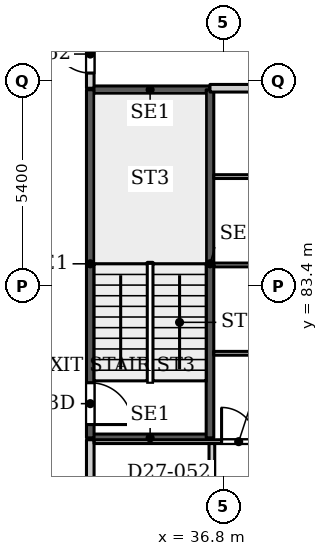
"""IFC4 building model, lengths in metres.
Left out: names, types, materials, properties, quantities, classifications, styles, units other than length and angle.
Written with IfcOpenShell. Run it as: python <this file> out.ifc"""

import sys

from ifc_helpers import new_model, si_unit, direction, frame, frame_2d, origin, place, context, subcontext, project, spatial, rectangle, extrude, source, transform, mapped, element, fill, save


model = new_model("IFC4")
c1 = context("Model", 3, precision=1e-05, world=origin(), true_north=direction((0.0, 1.0)))
c2 = subcontext(c1, "Body", "Model", "MODEL_VIEW")
j1 = project(units=[si_unit("LENGTHUNIT", "METRE"), si_unit("PLANEANGLEUNIT", "RADIAN")], contexts=[c1])
p1 = place(None, origin())
s1 = spatial("IfcSite", under=j1, at=p1, CompositionType="ELEMENT")
p2 = place(p1, origin())
s2 = spatial("IfcBuilding", under=s1, at=p2, CompositionType="ELEMENT")
p3 = place(p2, frame((0.0, 0.0, 121.4)))
s3 = spatial("IfcBuildingStorey", under=s2, at=p3, CompositionType="ELEMENT", Elevation=121.4)
for number, where, z_axis, x_axis in (
    (1, (33.3, 79.4, 0.0), (0.0, 0.0, 1.0), (1.0, 0.0, 0.0)),
    (2, (33.3, 88.56, 0.0), (0.0, 0.0, 1.0), (1.0, 0.0, 0.0)),
):
    element("IfcWall", number, at=place(p3, frame(where, z_axis=z_axis, x_axis=x_axis)), inside=s3, PredefinedType="SHEAR", context=c2, shape_type="SweptSolid", body=[
        extrude(rectangle(XDim=3.15, YDim=0.2, at=frame_2d((1.575, 0.0))), origin(), (0.0, 0.0, 1.0), 3.9),
    ])
p4 = place(p3, frame((33.3, 79.4, 0.0), z_axis=(0.0, 0.0, 1.0), x_axis=(0.0, 1.0, 0.0)))
e3 = element("IfcWall", 3, at=p4, inside=s3, PredefinedType="SHEAR", context=c2, shape_type="SweptSolid", body=[
    extrude(rectangle(XDim=9.16, YDim=0.2, at=frame_2d((4.58, 0.0))), origin(), (0.0, 0.0, 1.0), 3.9),
])
p5 = place(p4, frame((0.35, 0.0, 0.0)))
e4 = element("IfcOpeningElement", 4, at=p5, cuts=e3, PredefinedType="OPENING", context=c2, shape_type="SweptSolid", body=[
    extrude(rectangle(XDim=1.1, YDim=2.2, at=frame_2d((0.55, 1.1))), frame((0.0, 0.11, 0.0), z_axis=(0.0, -1.0, 0.0), x_axis=(1.0, 0.0, 0.0)), (0.0, 0.0, 1.0), 0.22),
])
p6 = place(p3, frame((36.45, 79.4, 0.0), z_axis=(0.0, 0.0, 1.0), x_axis=(0.0, 1.0, 0.0)))
e5 = element("IfcWall", 5, at=p6, inside=s3, PredefinedType="SHEAR", context=c2, shape_type="SweptSolid", body=[
    extrude(rectangle(XDim=9.16, YDim=0.2, at=frame_2d((4.58, 0.0))), origin(), (0.0, 0.0, 1.0), 3.9),
])
p7 = place(p3, frame((33.3, 54.4, 0.0), z_axis=(0.0, 0.0, 1.0), x_axis=(0.0, 1.0, 0.0)))
e6 = element("IfcWall", 6, at=p7, inside=s3, PredefinedType="PARTITIONING", context=c2, shape_type="SweptSolid", body=[
    extrude(rectangle(XDim=24.95, YDim=0.2, at=frame_2d((12.475, 0.0))), origin(), (0.0, 0.0, 1.0), 3.6),
])
p8 = place(p7, frame((3.1, 0.0, 0.0)))
e7 = element("IfcOpeningElement", 7, at=p8, cuts=e6, PredefinedType="OPENING", context=c2, shape_type="SweptSolid", body=[
    extrude(rectangle(XDim=1.0, YDim=2.1, at=frame_2d((0.5, 1.05))), frame((0.0, 0.11, 0.0), z_axis=(0.0, -1.0, 0.0), x_axis=(1.0, 0.0, 0.0)), (0.0, 0.0, 1.0), 0.22),
])
p9 = place(p7, frame((14.8, 0.0, 0.0)))
e8 = element("IfcOpeningElement", 8, at=p9, cuts=e6, PredefinedType="OPENING", context=c2, shape_type="SweptSolid", body=[
    extrude(rectangle(XDim=1.0, YDim=2.1, at=frame_2d((0.5, 1.05))), frame((0.0, 0.11, 0.0), z_axis=(0.0, -1.0, 0.0), x_axis=(1.0, 0.0, 0.0)), (0.0, 0.0, 1.0), 0.22),
])
p10 = place(p3, frame((33.3, 88.6, 0.0), z_axis=(0.0, 0.0, 1.0), x_axis=(0.0, 1.0, 0.0)))
e9 = element("IfcWall", 9, at=p10, inside=s3, PredefinedType="PARTITIONING", context=c2, shape_type="SweptSolid", body=[
    extrude(rectangle(XDim=5.175, YDim=0.2, at=frame_2d((2.587, 0.0))), origin(), (0.0, 0.0, 1.0), 3.6),
])
p11 = place(p10, frame((0.4, 0.0, 0.0)))
e10 = element("IfcOpeningElement", 10, at=p11, cuts=e9, PredefinedType="OPENING", context=c2, shape_type="SweptSolid", body=[
    extrude(rectangle(XDim=1.0, YDim=2.1, at=frame_2d((0.5, 1.05))), frame((0.0, 0.11, 0.0), z_axis=(0.0, -1.0, 0.0), x_axis=(1.0, 0.0, 0.0)), (0.0, 0.0, 1.0), 0.22),
])
p12 = place(p3, frame((33.4, 79.3, 0.0), z_axis=(0.0, 0.0, 1.0), x_axis=(1.0, 0.0, 0.0)))
e11 = element("IfcWall", 11, at=p12, inside=s3, PredefinedType="PARTITIONING", context=c2, shape_type="SweptSolid", body=[
    extrude(rectangle(XDim=12.5, YDim=0.1, at=frame_2d((6.25, 0.0))), origin(), (0.0, 0.0, 1.0), 3.6),
])
p13 = place(p12, frame((3.355, 0.0, 0.0)))
e12 = element("IfcOpeningElement", 12, at=p13, cuts=e11, PredefinedType="OPENING", context=c2, shape_type="SweptSolid", body=[
    extrude(rectangle(XDim=0.9, YDim=2.1, at=frame_2d((0.45, 1.05))), frame((0.0, 0.06, 0.0), z_axis=(0.0, -1.0, 0.0), x_axis=(1.0, 0.0, 0.0)), (0.0, 0.0, 1.0), 0.12),
])
p14 = place(p3, frame((36.5, 71.125, 0.0), z_axis=(0.0, 0.0, 1.0), x_axis=(0.0, 1.0, 0.0)))
e13 = element("IfcWall", 13, at=p14, inside=s3, PredefinedType="PARTITIONING", context=c2, shape_type="SweptSolid", body=[
    extrude(rectangle(XDim=8.125, YDim=0.15, at=frame_2d((4.062, 0.0))), origin(), (0.0, 0.0, 1.0), 3.6),
])
p15 = place(p14, frame((0.875, 0.0, 0.0)))
e14 = element("IfcOpeningElement", 14, at=p15, cuts=e13, PredefinedType="OPENING", context=c2, shape_type="SweptSolid", body=[
    extrude(rectangle(XDim=0.8, YDim=2.1, at=frame_2d((0.4, 1.05))), frame((0.0, 0.085, 0.0), z_axis=(0.0, -1.0, 0.0), x_axis=(1.0, 0.0, 0.0)), (0.0, 0.0, 1.0), 0.17),
])
p16 = place(p14, frame((5.775, 0.0, 0.0)))
e15 = element("IfcOpeningElement", 15, at=p16, cuts=e13, PredefinedType="OPENING", context=c2, shape_type="SweptSolid", body=[
    extrude(rectangle(XDim=0.9, YDim=2.1, at=frame_2d((0.45, 1.05))), frame((0.0, 0.085, 0.0), z_axis=(0.0, -1.0, 0.0), x_axis=(1.0, 0.0, 0.0)), (0.0, 0.0, 1.0), 0.17),
])
p17 = place(p14, frame((2.975, 0.0, 0.0)))
e16 = element("IfcOpeningElement", 16, at=p17, cuts=e13, PredefinedType="OPENING", context=c2, shape_type="SweptSolid", body=[
    extrude(rectangle(XDim=0.8, YDim=2.1, at=frame_2d((0.4, 1.05))), frame((0.0, 0.085, 0.0), z_axis=(0.0, -1.0, 0.0), x_axis=(1.0, 0.0, 0.0)), (0.0, 0.0, 1.0), 0.17),
])
p18 = place(p3, frame((36.45, 88.6, 0.0), z_axis=(0.0, 0.0, 1.0), x_axis=(1.0, 0.0, 0.0)))
e17 = element("IfcWall", 17, at=p18, inside=s3, PredefinedType="PARTITIONING", context=c2, shape_type="SweptSolid", body=[
    extrude(rectangle(XDim=9.45, YDim=0.2, at=frame_2d((4.725, 0.0))), origin(), (0.0, 0.0, 1.0), 2.5),
])
p19 = place(p3, frame((36.549, 81.625, 0.0), z_axis=(0.0, 0.0, 1.0), x_axis=(1.0, 0.0, 0.0)))
e18 = element("IfcWall", 18, at=p19, inside=s3, PredefinedType="PARTITIONING", context=c2, shape_type="SweptSolid", body=[
    extrude(rectangle(XDim=9.351, YDim=0.1, at=frame_2d((4.675, 0.0))), origin(), (0.0, 0.0, 1.0), 3.6),
])
p20 = place(p19, frame((4.176, 0.0, 0.0)))
e19 = element("IfcOpeningElement", 19, at=p20, cuts=e18, PredefinedType="OPENING", context=c2, shape_type="SweptSolid", body=[
    extrude(rectangle(XDim=0.9, YDim=2.1, at=frame_2d((0.45, 1.05))), frame((0.0, 0.06, 0.0), z_axis=(0.0, -1.0, 0.0), x_axis=(1.0, 0.0, 0.0)), (0.0, 0.0, 1.0), 0.12),
])
p21 = place(p3, frame((36.549, 83.95, 0.0), z_axis=(0.0, 0.0, 1.0), x_axis=(1.0, 0.0, 0.0)))
e20 = element("IfcWall", 20, at=p21, inside=s3, PredefinedType="PARTITIONING", context=c2, shape_type="SweptSolid", body=[
    extrude(rectangle(XDim=9.351, YDim=0.1, at=frame_2d((4.675, 0.0))), origin(), (0.0, 0.0, 1.0), 3.6),
])
p22 = place(p21, frame((4.176, 0.0, 0.0)))
e21 = element("IfcOpeningElement", 21, at=p22, cuts=e20, PredefinedType="OPENING", context=c2, shape_type="SweptSolid", body=[
    extrude(rectangle(XDim=0.9, YDim=2.1, at=frame_2d((0.45, 1.05))), frame((0.0, 0.06, 0.0), z_axis=(0.0, -1.0, 0.0), x_axis=(1.0, 0.0, 0.0)), (0.0, 0.0, 1.0), 0.12),
])
p23 = place(p3, frame((36.549, 86.275, 0.0), z_axis=(0.0, 0.0, 1.0), x_axis=(1.0, 0.0, 0.0)))
e22 = element("IfcWall", 22, at=p23, inside=s3, PredefinedType="PARTITIONING", context=c2, shape_type="SweptSolid", body=[
    extrude(rectangle(XDim=9.351, YDim=0.1, at=frame_2d((4.675, 0.0))), origin(), (0.0, 0.0, 1.0), 3.6),
])
p24 = place(p23, frame((4.176, 0.0, 0.0)))
e23 = element("IfcOpeningElement", 23, at=p24, cuts=e22, PredefinedType="OPENING", context=c2, shape_type="SweptSolid", body=[
    extrude(rectangle(XDim=0.9, YDim=2.1, at=frame_2d((0.45, 1.05))), frame((0.0, 0.06, 0.0), z_axis=(0.0, -1.0, 0.0), x_axis=(1.0, 0.0, 0.0)), (0.0, 0.0, 1.0), 0.12),
])
m1 = source(origin(), c2, "Body", "SweptSolid", [
    extrude(rectangle(XDim=1.1, YDim=2.2, at=frame_2d((0.55, 1.1))), frame((0.0, 0.025, 0.0), z_axis=(0.0, -1.0, 0.0), x_axis=(1.0, 0.0, 0.0)), (0.0, 0.0, 1.0), 0.05),
])
p25 = place(p5, origin())
e24 = element("IfcDoor", 24, at=p25, inside=s3, OperationType="SINGLE_SWING_RIGHT", PredefinedType="DOOR", context=c2, shape_type="MappedRepresentation", body=[
    mapped(m1, transform((0.0, 0.0, 0.0), x_axis=(1.0, 0.0, 0.0), y_axis=(0.0, 1.0, 0.0), z_axis=(0.0, 0.0, 1.0), scale=1.0)),
])
fill(e4, e24)
m2 = source(origin(), c2, "Body", "SweptSolid", [
    extrude(rectangle(XDim=0.9, YDim=2.1, at=frame_2d((0.45, 1.05))), frame((0.0, 0.025, 0.0), z_axis=(0.0, -1.0, 0.0), x_axis=(1.0, 0.0, 0.0)), (0.0, 0.0, 1.0), 0.05),
])
p26 = place(p13, origin())
e25 = element("IfcDoor", 25, at=p26, inside=s3, OperationType="SINGLE_SWING_LEFT", PredefinedType="DOOR", context=c2, shape_type="MappedRepresentation", body=[
    mapped(m2, transform((0.0, 0.0, 0.0), x_axis=(1.0, 0.0, 0.0), y_axis=(0.0, 1.0, 0.0), z_axis=(0.0, 0.0, 1.0), scale=1.0)),
])
fill(e12, e25)
m3 = source(origin(), c2, "Body", "SweptSolid", [
    extrude(rectangle(XDim=1.0, YDim=2.1, at=frame_2d((0.5, 1.05))), frame((0.0, 0.025, 0.0), z_axis=(0.0, -1.0, 0.0), x_axis=(1.0, 0.0, 0.0)), (0.0, 0.0, 1.0), 0.05),
])
p27 = place(p11, origin())
e26 = element("IfcDoor", 26, at=p27, inside=s3, OperationType="SINGLE_SWING_LEFT", PredefinedType="DOOR", context=c2, shape_type="MappedRepresentation", body=[
    mapped(m3, transform((0.0, 0.0, 0.0), x_axis=(1.0, 0.0, 0.0), y_axis=(0.0, 1.0, 0.0), z_axis=(0.0, 0.0, 1.0), scale=1.0)),
])
fill(e10, e26)
save(model, sys.argv[1])
